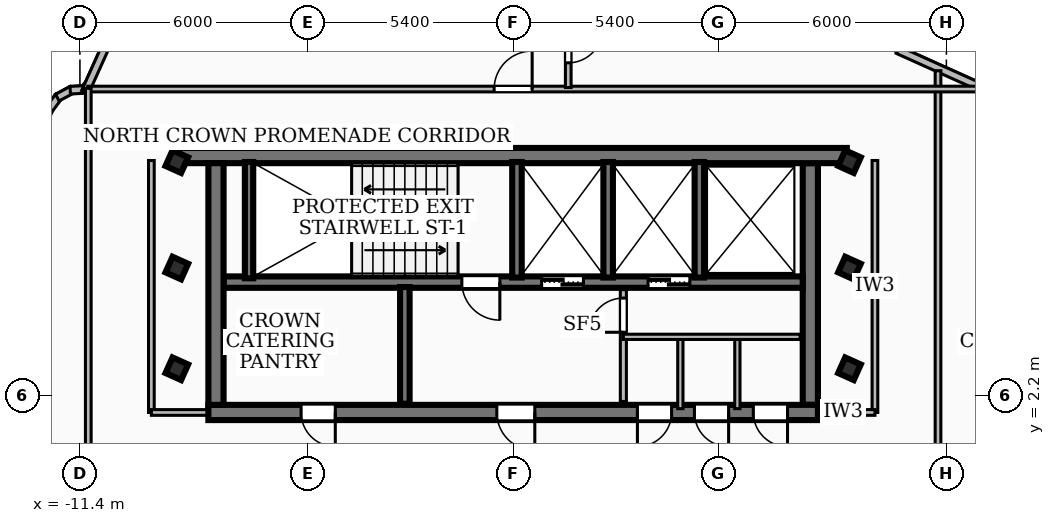
"""IFC4 building model, lengths in metres.
Left out: names, types, materials, properties, quantities, classifications, styles, units other than length and angle.
Written with IfcOpenShell. Run it as: python <this file> out.ifc"""

import sys

from ifc_helpers import new_model, si_unit, direction, frame, frame_2d, origin, origin_2d, place, context, subcontext, project, spatial, rectangle, hollow_rectangle, extrude, element, fill, save


model = new_model("IFC4")
c1 = context("Model", 3, precision=1e-05, world=origin(), true_north=direction((0.0, 1.0)))
c2 = subcontext(c1, "Body", "Model", "MODEL_VIEW")
j1 = project(units=[si_unit("LENGTHUNIT", "METRE"), si_unit("PLANEANGLEUNIT", "RADIAN")], contexts=[c1])
p1 = place(None, origin())
s1 = spatial("IfcSite", under=j1, at=p1, CompositionType="ELEMENT")
p2 = place(p1, origin())
s2 = spatial("IfcBuilding", under=s1, at=p2, CompositionType="ELEMENT")
p3 = place(p2, frame((0.0, 0.0, 297.54)))
s3 = spatial("IfcBuildingStorey", under=s2, at=p3, CompositionType="ELEMENT", Elevation=297.54)
p4 = place(p3, frame((-8.78, 8.51, 0.0), z_axis=(0.0, 0.0, 1.0), x_axis=(1.0, 0.0, 0.0)))
e1 = element("IfcWall", 1, at=p4, inside=s3, PredefinedType="SHEAR", context=c2, shape_type="SweptSolid", body=[
    extrude(rectangle(XDim=17.56, YDim=0.4, at=frame_2d((8.78, 0.0))), origin(), (0.0, 0.0, 1.0), 3.84),
])
p5 = place(p3, frame((8.02, 1.75, 0.0), z_axis=(0.0, 0.0, 1.0), x_axis=(-1.0, 0.0, 0.0)))
e2 = element("IfcWall", 2, at=p5, inside=s3, PredefinedType="SHEAR", context=c2, shape_type="SweptSolid", body=[
    extrude(rectangle(XDim=16.04, YDim=0.4, at=frame_2d((8.02, 0.0))), origin(), (0.0, 0.0, 1.0), 3.84),
])
p6 = place(p5, frame((7.45, 0.0, 0.0)))
e3 = element("IfcOpeningElement", 3, at=p6, cuts=e2, PredefinedType="OPENING", context=c2, shape_type="SweptSolid", body=[
    extrude(rectangle(XDim=1.0, YDim=2.1, at=frame_2d((0.5, 1.05))), frame((0.0, 0.21, 0.0), z_axis=(0.0, -1.0, 0.0), x_axis=(1.0, 0.0, 0.0)), (0.0, 0.0, 1.0), 0.42),
])
p7 = place(p5, frame((12.7, 0.0, 0.0)))
e4 = element("IfcOpeningElement", 4, at=p7, cuts=e2, PredefinedType="OPENING", context=c2, shape_type="SweptSolid", body=[
    extrude(rectangle(XDim=0.9, YDim=2.06, at=frame_2d((0.45, 1.03))), frame((0.0, 0.21, 0.0), z_axis=(0.0, -1.0, 0.0), x_axis=(1.0, 0.0, 0.0)), (0.0, 0.0, 1.0), 0.42),
])
p8 = place(p5, frame((3.85, 0.0, 0.0)))
e5 = element("IfcOpeningElement", 5, at=p8, cuts=e2, PredefinedType="OPENING", context=c2, shape_type="SweptSolid", body=[
    extrude(rectangle(XDim=0.9, YDim=2.06, at=frame_2d((0.45, 1.03))), frame((0.0, 0.21, 0.0), z_axis=(0.0, -1.0, 0.0), x_axis=(1.0, 0.0, 0.0)), (0.0, 0.0, 1.0), 0.42),
])
p9 = place(p5, frame((2.35, 0.0, 0.0)))
e6 = element("IfcOpeningElement", 6, at=p9, cuts=e2, PredefinedType="OPENING", context=c2, shape_type="SweptSolid", body=[
    extrude(rectangle(XDim=0.9, YDim=2.06, at=frame_2d((0.45, 1.03))), frame((0.0, 0.21, 0.0), z_axis=(0.0, -1.0, 0.0), x_axis=(1.0, 0.0, 0.0)), (0.0, 0.0, 1.0), 0.42),
])
p10 = place(p5, frame((0.8, 0.0, 0.0)))
e7 = element("IfcOpeningElement", 7, at=p10, cuts=e2, PredefinedType="OPENING", context=c2, shape_type="SweptSolid", body=[
    extrude(rectangle(XDim=0.9, YDim=2.06, at=frame_2d((0.45, 1.03))), frame((0.0, 0.21, 0.0), z_axis=(0.0, -1.0, 0.0), x_axis=(1.0, 0.0, 0.0)), (0.0, 0.0, 1.0), 0.42),
])
for number, where, z_axis, x_axis in (
    (8, (-7.82, 1.95, 0.0), (0.0, 0.0, 1.0), (0.0, 1.0, 0.0)),
    (9, (7.82, 8.31, 0.0), (0.0, 0.0, 1.0), (0.0, -1.0, 0.0)),
):
    element("IfcWall", number, at=place(p3, frame(where, z_axis=z_axis, x_axis=x_axis)), inside=s3, PredefinedType="SHEAR", context=c2, shape_type="SweptSolid", body=[
        extrude(rectangle(XDim=6.36, YDim=0.4, at=frame_2d((3.18, 0.0))), origin(), (0.0, 0.0, 1.0), 3.84),
    ])
p11 = place(p3, frame((7.62, 5.18, 0.0), z_axis=(0.0, 0.0, 1.0), x_axis=(-1.0, 0.0, 0.0)))
e10 = element("IfcWall", 10, at=p11, inside=s3, PredefinedType="SOLIDWALL", context=c2, shape_type="SweptSolid", body=[
    extrude(rectangle(XDim=15.24, YDim=0.3, at=frame_2d((7.62, 0.0))), origin(), (0.0, 0.0, 1.0), 3.84),
])
p12 = place(p11, frame((5.77, 0.0, 0.0)))
e11 = element("IfcOpeningElement", 11, at=p12, cuts=e10, PredefinedType="OPENING", context=c2, shape_type="SweptSolid", body=[
    extrude(rectangle(XDim=1.1, YDim=2.15, at=frame_2d((0.55, 1.075))), frame((0.0, 0.16, 0.0), z_axis=(0.0, -1.0, 0.0), x_axis=(1.0, 0.0, 0.0)), (0.0, 0.0, 1.0), 0.32),
])
p13 = place(p11, frame((2.97, 0.0, 0.0)))
e12 = element("IfcOpeningElement", 12, at=p13, cuts=e10, PredefinedType="OPENING", context=c2, shape_type="SweptSolid", body=[
    extrude(rectangle(XDim=1.1, YDim=2.15, at=frame_2d((0.55, 1.075))), frame((0.0, 0.16, 0.0), z_axis=(0.0, -1.0, 0.0), x_axis=(1.0, 0.0, 0.0)), (0.0, 0.0, 1.0), 0.32),
])
p14 = place(p11, frame((7.97, 0.0, 0.0)))
e13 = element("IfcOpeningElement", 13, at=p14, cuts=e10, PredefinedType="OPENING", context=c2, shape_type="SweptSolid", body=[
    extrude(rectangle(XDim=1.0, YDim=2.1, at=frame_2d((0.5, 1.05))), frame((0.0, 0.16, 0.0), z_axis=(0.0, -1.0, 0.0), x_axis=(1.0, 0.0, 0.0)), (0.0, 0.0, 1.0), 0.32),
])
p15 = place(p3, frame((-6.95, 5.28, 0.0), z_axis=(0.0, 0.0, 1.0), x_axis=(0.0, 1.0, 0.0)))
e14 = element("IfcWall", 14, at=p15, inside=s3, PredefinedType="SOLIDWALL", context=c2, shape_type="SweptSolid", body=[
    extrude(rectangle(XDim=3.06, YDim=0.22, at=frame_2d((1.53, 0.0))), origin(), (0.0, 0.0, 1.0), 3.84),
])
for number, where, z_axis, x_axis in (
    (15, (0.1, 5.3, 0.0), (0.0, 0.0, 1.0), (0.0, 1.0, 0.0)),
    (16, (2.5, 5.3, 0.0), (0.0, 0.0, 1.0), (0.0, 1.0, 0.0)),
    (17, (4.9, 5.3, 0.0), (0.0, 0.0, 1.0), (0.0, 1.0, 0.0)),
):
    element("IfcWall", number, at=place(p3, frame(where, z_axis=z_axis, x_axis=x_axis)), inside=s3, PredefinedType="SOLIDWALL", context=c2, shape_type="SweptSolid", body=[
        extrude(rectangle(XDim=3.04, YDim=0.25, at=frame_2d((1.52, 0.0))), origin(), (0.0, 0.0, 1.0), 3.84),
    ])
p16 = place(p3, frame((-2.85, 1.98, 0.0), z_axis=(0.0, 0.0, 1.0), x_axis=(0.0, 1.0, 0.0)))
e18 = element("IfcWall", 18, at=p16, inside=s3, PredefinedType="SOLIDWALL", context=c2, shape_type="SweptSolid", body=[
    extrude(rectangle(XDim=3.07, YDim=0.25, at=frame_2d((1.535, 0.0))), origin(), (0.0, 0.0, 1.0), 3.84),
])
for number, where, z_axis, x_axis in (
    (19, (-8.85, 2.9, 0.0), (0.0, 0.0, 1.0), (0.411, 0.912, 0.0)),
    (20, (-8.85, 5.55, 0.0), (0.0, 0.0, 1.0), (0.411, 0.912, 0.0)),
    (21, (8.85, 2.9, 0.0), (0.0, 0.0, 1.0), (0.411, 0.912, 0.0)),
    (22, (8.85, 5.55, 0.0), (0.0, 0.0, 1.0), (0.411, 0.912, 0.0)),
    (23, (-8.85, 8.35, 0.0), (0.0, 0.0, 1.0), (0.411, 0.912, 0.0)),
    (24, (8.85, 8.35, 0.0), (0.0, 0.0, 1.0), (0.411, 0.912, 0.0)),
):
    element("IfcColumn", number, at=place(p3, frame(where, z_axis=z_axis, x_axis=x_axis)), inside=s3, PredefinedType="COLUMN", context=c2, shape_type="SweptSolid", body=[
        extrude(hollow_rectangle(XDim=0.45, YDim=0.45, WallThickness=0.022, at=origin_2d()), origin(), (0.0, 0.0, 1.0), 4.14),
    ])
p17 = place(p3, frame((-15.387, 2.673, 0.0), z_axis=(0.0, 0.0, 1.0), x_axis=(0.41050728393, 0.911857318795, 0.0)))
e25 = element("IfcWall", 25, at=p17, inside=s3, PredefinedType="SOLIDWALL", context=c2, shape_type="SweptSolid", body=[
    extrude(rectangle(XDim=7.759, YDim=0.2, at=frame_2d((3.879, 0.0))), origin(), (0.0, 0.0, 1.0), 3.84),
])
p18 = place(p3, frame((-12.227, 9.705, 0.0), z_axis=(0.0, 0.0, 1.0), x_axis=(0.597741167546, 0.801689152116, 0.0)))
e26 = element("IfcWall", 26, at=p18, inside=s3, PredefinedType="SOLIDWALL", context=c2, shape_type="SweptSolid", body=[
    extrude(rectangle(XDim=0.45, YDim=0.2, at=frame_2d((0.225, 0.0))), origin(), (0.0, 0.0, 1.0), 3.84),
])
p19 = place(p3, frame((-11.995, 10.034, 0.0), z_axis=(0.0, 0.0, 1.0), x_axis=(0.880934398169, 0.473238403052, 0.0)))
e27 = element("IfcWall", 27, at=p19, inside=s3, PredefinedType="SOLIDWALL", context=c2, shape_type="SweptSolid", body=[
    extrude(rectangle(XDim=0.439, YDim=0.2, at=frame_2d((0.22, 0.0))), origin(), (0.0, 0.0, 1.0), 3.84),
])
p20 = place(p3, frame((-11.655, 10.229, 0.0), z_axis=(0.0, 0.0, 1.0), x_axis=(0.998558429255, 0.053675537844, 0.0)))
e28 = element("IfcWall", 28, at=p20, inside=s3, PredefinedType="SOLIDWALL", context=c2, shape_type="SweptSolid", body=[
    extrude(rectangle(XDim=0.505, YDim=0.2, at=frame_2d((0.252, 0.0))), origin(), (0.0, 0.0, 1.0), 3.84),
])
p21 = place(p3, frame((-11.264, 10.179, 0.0), z_axis=(0.0, 0.0, 1.0), x_axis=(0.410547059118, 0.911839411437, 0.0)))
e29 = element("IfcWall", 29, at=p21, inside=s3, PredefinedType="SOLIDWALL", context=c2, shape_type="SweptSolid", body=[
    extrude(rectangle(XDim=8.905, YDim=0.2, at=frame_2d((4.453, 0.0))), origin(), (0.0, 0.0, 1.0), 3.84),
])
p22 = place(p3, frame((11.842, 14.904, 0.0), z_axis=(0.0, 0.0, 1.0), x_axis=(-0.410578530723, -0.911825240991, 0.0)))
e30 = element("IfcWall", 30, at=p22, inside=s3, PredefinedType="SOLIDWALL", context=c2, shape_type="SweptSolid", body=[
    extrude(rectangle(XDim=4.082, YDim=0.2, at=frame_2d((2.041, 0.0))), origin(), (0.0, 0.0, 1.0), 3.84),
])
p23 = place(p3, frame((10.126, 11.288, 0.0), z_axis=(0.0, 0.0, 1.0), x_axis=(0.911826178024, -0.410576449728, 0.0)))
e31 = element("IfcWall", 31, at=p23, inside=s3, PredefinedType="SOLIDWALL", context=c2, shape_type="SweptSolid", body=[
    extrude(rectangle(XDim=8.963, YDim=0.2, at=frame_2d((4.482, 0.0))), origin(), (0.0, 0.0, 1.0), 3.84),
])
p24 = place(p3, frame((2.9, 2.04, 0.0), z_axis=(0.0, 0.0, 1.0), x_axis=(0.0, 1.0, 0.0)))
e32 = element("IfcWall", 32, at=p24, inside=s3, PredefinedType="PARTITIONING", context=c2, shape_type="SweptSolid", body=[
    extrude(rectangle(XDim=2.94, YDim=0.16, at=frame_2d((1.47, 0.0))), origin(), (0.0, 0.0, 1.0), 3.07),
])
p25 = place(p24, frame((1.82, 0.0, 0.0)))
e33 = element("IfcOpeningElement", 33, at=p25, cuts=e32, PredefinedType="OPENING", context=c2, shape_type="SweptSolid", body=[
    extrude(rectangle(XDim=0.9, YDim=2.06, at=frame_2d((0.45, 1.03))), frame((0.0, 0.09, 0.0), z_axis=(0.0, -1.0, 0.0), x_axis=(1.0, 0.0, 0.0)), (0.0, 0.0, 1.0), 0.18),
])
p26 = place(p3, frame((2.9, 3.74, 0.0), z_axis=(0.0, 0.0, 1.0), x_axis=(1.0, 0.0, 0.0)))
e34 = element("IfcWall", 34, at=p26, inside=s3, PredefinedType="PARTITIONING", context=c2, shape_type="SweptSolid", body=[
    extrude(rectangle(XDim=4.65, YDim=0.138, at=frame_2d((2.325, 0.0))), origin(), (0.0, 0.0, 1.0), 3.84),
])
for number, where, z_axis, x_axis in (
    (35, (4.4, 1.85, 0.0), (0.0, 0.0, 1.0), (0.0, 1.0, 0.0)),
    (36, (5.9, 1.85, 0.0), (0.0, 0.0, 1.0), (0.0, 1.0, 0.0)),
):
    element("IfcWall", number, at=place(p3, frame(where, z_axis=z_axis, x_axis=x_axis)), inside=s3, PredefinedType="PARTITIONING", context=c2, shape_type="SweptSolid", body=[
        extrude(rectangle(XDim=1.89, YDim=0.138, at=frame_2d((0.945, 0.0))), origin(), (0.0, 0.0, 1.0), 3.07),
    ])
p27 = place(p3, frame((-9.52, 1.75, 0.0), z_axis=(0.0, 0.0, 1.0), x_axis=(0.0, 1.0, 0.0)))
e37 = element("IfcWall", 37, at=p27, inside=s3, PredefinedType="PARTITIONING", context=c2, shape_type="SweptSolid", body=[
    extrude(rectangle(XDim=6.63, YDim=0.15, at=frame_2d((3.315, 0.0))), origin(), (0.0, 0.0, 1.0), 3.21),
])
p28 = place(p3, frame((-7.85, 1.75, 0.0), z_axis=(0.0, 0.0, 1.0), x_axis=(-1.0, 0.0, 0.0)))
e38 = element("IfcWall", 38, at=p28, inside=s3, PredefinedType="PARTITIONING", context=c2, shape_type="SweptSolid", body=[
    extrude(rectangle(XDim=1.67, YDim=0.15, at=frame_2d((0.835, 0.0))), origin(), (0.0, 0.0, 1.0), 3.07),
])
p29 = place(p3, frame((9.52, 1.75, 0.0), z_axis=(0.0, 0.0, 1.0), x_axis=(0.0, 1.0, 0.0)))
e39 = element("IfcWall", 39, at=p29, inside=s3, PredefinedType="PARTITIONING", context=c2, shape_type="SweptSolid", body=[
    extrude(rectangle(XDim=6.63, YDim=0.15, at=frame_2d((3.315, 0.0))), origin(), (0.0, 0.0, 1.0), 3.84),
])
p30 = place(p3, frame((7.85, 1.75, 0.0), z_axis=(0.0, 0.0, 1.0), x_axis=(1.0, 0.0, 0.0)))
e40 = element("IfcWall", 40, at=p30, inside=s3, PredefinedType="PARTITIONING", context=c2, shape_type="SweptSolid", body=[
    extrude(rectangle(XDim=1.67, YDim=0.15, at=frame_2d((0.835, 0.0))), origin(), (0.0, 0.0, 1.0), 3.07),
])
p31 = place(p3, frame((11.18, 10.742, 0.0), z_axis=(0.0, 0.0, 1.0), x_axis=(0.0, -1.0, 0.0)))
e41 = element("IfcWall", 41, at=p31, inside=s3, PredefinedType="PARTITIONING", context=c2, shape_type="SweptSolid", body=[
    extrude(rectangle(XDim=21.02, YDim=0.15, at=frame_2d((10.51, 0.0))), origin(), (0.0, 0.0, 1.0), 3.21),
])
p32 = place(p31, frame((10.242, 0.0, 0.0)))
e42 = element("IfcOpeningElement", 42, at=p32, cuts=e41, PredefinedType="OPENING", context=c2, shape_type="SweptSolid", body=[
    extrude(rectangle(XDim=1.0, YDim=2.1, at=frame_2d((0.5, 1.05))), frame((0.0, 0.085, 0.0), z_axis=(0.0, -1.0, 0.0), x_axis=(1.0, 0.0, 0.0)), (0.0, 0.0, 1.0), 0.17),
])
p33 = place(p3, frame((-11.194, 10.26, 0.0), z_axis=(0.0, 0.0, 1.0), x_axis=(1.0, 0.0, 0.0)))
e43 = element("IfcWall", 43, at=p33, inside=s3, PredefinedType="PARTITIONING", context=c2, shape_type="SweptSolid", body=[
    extrude(rectangle(XDim=23.445, YDim=0.15, at=frame_2d((11.723, 0.0))), origin(), (0.0, 0.0, 1.0), 3.21),
])
p34 = place(p33, frame((10.694, 0.0, 0.0)))
e44 = element("IfcOpeningElement", 44, at=p34, cuts=e43, PredefinedType="OPENING", context=c2, shape_type="SweptSolid", body=[
    extrude(rectangle(XDim=1.0, YDim=2.1, at=frame_2d((0.5, 1.05))), frame((0.0, 0.085, 0.0), z_axis=(0.0, -1.0, 0.0), x_axis=(1.0, 0.0, 0.0)), (0.0, 0.0, 1.0), 0.17),
])
p35 = place(p3, frame((-11.18, -10.742, 0.0), z_axis=(0.0, 0.0, 1.0), x_axis=(0.0, 1.0, 0.0)))
e45 = element("IfcWall", 45, at=p35, inside=s3, PredefinedType="PARTITIONING", context=c2, shape_type="SweptSolid", body=[
    extrude(rectangle(XDim=21.02, YDim=0.15, at=frame_2d((10.51, 0.0))), origin(), (0.0, 0.0, 1.0), 3.21),
])
p36 = place(p35, frame((8.642, 0.0, 0.0)))
e46 = element("IfcOpeningElement", 46, at=p36, cuts=e45, PredefinedType="OPENING", context=c2, shape_type="SweptSolid", body=[
    extrude(rectangle(XDim=1.0, YDim=2.1, at=frame_2d((0.5, 1.05))), frame((0.0, 0.085, 0.0), z_axis=(0.0, -1.0, 0.0), x_axis=(1.0, 0.0, 0.0)), (0.0, 0.0, 1.0), 0.17),
])
p37 = place(p3, frame((1.45, 15.124, 0.0), z_axis=(0.0, 0.0, 1.0), x_axis=(0.0, -1.0, 0.0)))
e47 = element("IfcWall", 47, at=p37, inside=s3, PredefinedType="PARTITIONING", context=c2, shape_type="SweptSolid", body=[
    extrude(rectangle(XDim=4.824, YDim=0.15, at=frame_2d((2.412, 0.0))), origin(), (0.0, 0.0, 1.0), 3.84),
])
p38 = place(p37, frame((3.274, 0.0, 0.0)))
e48 = element("IfcOpeningElement", 48, at=p38, cuts=e47, PredefinedType="OPENING", context=c2, shape_type="SweptSolid", body=[
    extrude(rectangle(XDim=0.9, YDim=2.06, at=frame_2d((0.45, 1.03))), frame((0.0, 0.085, 0.0), z_axis=(0.0, -1.0, 0.0), x_axis=(1.0, 0.0, 0.0)), (0.0, 0.0, 1.0), 0.17),
])
p39 = place(p6, origin())
e49 = element("IfcDoor", 49, at=p39, inside=s3, OperationType="SINGLE_SWING_LEFT", PredefinedType="DOOR", context=c2, shape_type="SweptSolid", body=[
    extrude(rectangle(XDim=1.0, YDim=2.1, at=frame_2d((0.5, 1.05))), frame((0.0, 0.025, 0.0), z_axis=(0.0, -1.0, 0.0), x_axis=(1.0, 0.0, 0.0)), (0.0, 0.0, 1.0), 0.05),
])
fill(e3, e49)
p40 = place(p12, origin())
e50 = element("IfcDoor", 50, at=p40, inside=s3, OperationType="DOUBLE_DOOR_SLIDING", PredefinedType="DOOR", context=c2, shape_type="SweptSolid", body=[
    extrude(rectangle(XDim=1.1, YDim=2.15, at=frame_2d((0.55, 1.075))), frame((0.0, 0.025, 0.0), z_axis=(0.0, -1.0, 0.0), x_axis=(1.0, 0.0, 0.0)), (0.0, 0.0, 1.0), 0.05),
])
fill(e11, e50)
p41 = place(p13, origin())
e51 = element("IfcDoor", 51, at=p41, inside=s3, OperationType="DOUBLE_DOOR_SLIDING", PredefinedType="DOOR", context=c2, shape_type="SweptSolid", body=[
    extrude(rectangle(XDim=1.1, YDim=2.15, at=frame_2d((0.55, 1.075))), frame((0.0, 0.025, 0.0), z_axis=(0.0, -1.0, 0.0), x_axis=(1.0, 0.0, 0.0)), (0.0, 0.0, 1.0), 0.05),
])
fill(e12, e51)
p42 = place(p14, origin())
e52 = element("IfcDoor", 52, at=p42, inside=s3, OperationType="SINGLE_SWING_LEFT", PredefinedType="DOOR", context=c2, shape_type="SweptSolid", body=[
    extrude(rectangle(XDim=1.0, YDim=2.1, at=frame_2d((0.5, 1.05))), frame((0.0, 0.025, 0.0), z_axis=(0.0, -1.0, 0.0), x_axis=(1.0, 0.0, 0.0)), (0.0, 0.0, 1.0), 0.05),
])
fill(e13, e52)
p43 = place(p7, origin())
e53 = element("IfcDoor", 53, at=p43, inside=s3, OperationType="SINGLE_SWING_LEFT", PredefinedType="DOOR", context=c2, shape_type="SweptSolid", body=[
    extrude(rectangle(XDim=0.9, YDim=2.06, at=frame_2d((0.45, 1.03))), frame((0.0, 0.025, 0.0), z_axis=(0.0, -1.0, 0.0), x_axis=(1.0, 0.0, 0.0)), (0.0, 0.0, 1.0), 0.05),
])
fill(e4, e53)
p44 = place(p8, origin())
e54 = element("IfcDoor", 54, at=p44, inside=s3, OperationType="SINGLE_SWING_RIGHT", PredefinedType="DOOR", context=c2, shape_type="SweptSolid", body=[
    extrude(rectangle(XDim=0.9, YDim=2.06, at=frame_2d((0.45, 1.03))), frame((0.0, 0.025, 0.0), z_axis=(0.0, -1.0, 0.0), x_axis=(1.0, 0.0, 0.0)), (0.0, 0.0, 1.0), 0.05),
])
fill(e5, e54)
p45 = place(p9, origin())
e55 = element("IfcDoor", 55, at=p45, inside=s3, OperationType="SINGLE_SWING_LEFT", PredefinedType="DOOR", context=c2, shape_type="SweptSolid", body=[
    extrude(rectangle(XDim=0.9, YDim=2.06, at=frame_2d((0.45, 1.03))), frame((0.0, 0.025, 0.0), z_axis=(0.0, -1.0, 0.0), x_axis=(1.0, 0.0, 0.0)), (0.0, 0.0, 1.0), 0.05),
])
fill(e6, e55)
p46 = place(p10, origin())
e56 = element("IfcDoor", 56, at=p46, inside=s3, OperationType="SINGLE_SWING_LEFT", PredefinedType="DOOR", context=c2, shape_type="SweptSolid", body=[
    extrude(rectangle(XDim=0.9, YDim=2.06, at=frame_2d((0.45, 1.03))), frame((0.0, 0.025, 0.0), z_axis=(0.0, -1.0, 0.0), x_axis=(1.0, 0.0, 0.0)), (0.0, 0.0, 1.0), 0.05),
])
fill(e7, e56)
p47 = place(p25, origin())
e57 = element("IfcDoor", 57, at=p47, inside=s3, OperationType="SINGLE_SWING_LEFT", PredefinedType="DOOR", context=c2, shape_type="SweptSolid", body=[
    extrude(rectangle(XDim=0.9, YDim=2.06, at=frame_2d((0.45, 1.03))), frame((0.0, 0.025, 0.0), z_axis=(0.0, -1.0, 0.0), x_axis=(1.0, 0.0, 0.0)), (0.0, 0.0, 1.0), 0.05),
])
fill(e33, e57)
p48 = place(p34, origin())
e58 = element("IfcDoor", 58, at=p48, inside=s3, OperationType="SINGLE_SWING_RIGHT", PredefinedType="DOOR", context=c2, shape_type="SweptSolid", body=[
    extrude(rectangle(XDim=1.0, YDim=2.1, at=frame_2d((0.5, 1.05))), frame((0.0, 0.025, 0.0), z_axis=(0.0, -1.0, 0.0), x_axis=(1.0, 0.0, 0.0)), (0.0, 0.0, 1.0), 0.05),
])
fill(e44, e58)
p49 = place(p38, origin())
e59 = element("IfcDoor", 59, at=p49, inside=s3, OperationType="SINGLE_SWING_LEFT", PredefinedType="DOOR", context=c2, shape_type="SweptSolid", body=[
    extrude(rectangle(XDim=0.9, YDim=2.06, at=frame_2d((0.45, 1.03))), frame((0.0, 0.025, 0.0), z_axis=(0.0, -1.0, 0.0), x_axis=(1.0, 0.0, 0.0)), (0.0, 0.0, 1.0), 0.05),
])
fill(e48, e59)
save(model, sys.argv[1])
